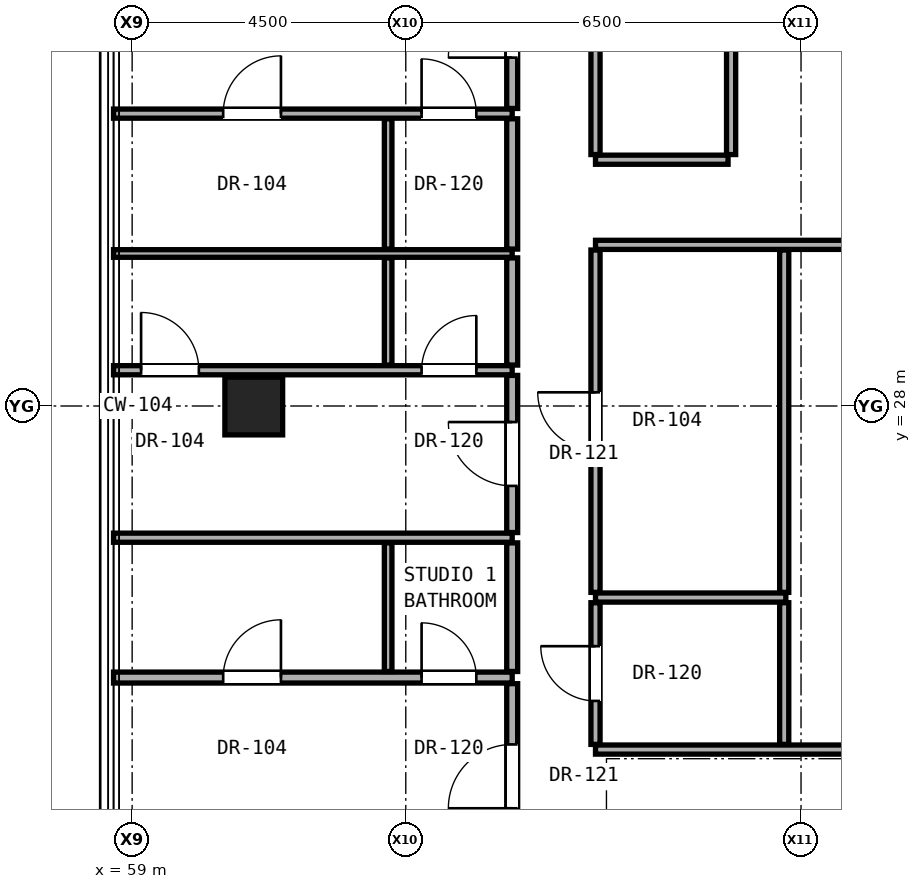
"""IFC4 building model, lengths in metres.
Left out: names, types, materials, properties, quantities, classifications, styles, units other than length and angle.
Written with IfcOpenShell. Run it as: python <this file> out.ifc"""

import sys

from ifc_helpers import new_model, si_unit, direction, frame, frame_2d, origin, origin_2d, place, context, subcontext, project, spatial, rectangle, hollow_rectangle, extrude, element, fill, save


model = new_model("IFC4")
c1 = context("Model", 3, precision=1e-05, world=origin(), true_north=direction((0.0, 1.0)))
c2 = subcontext(c1, "Body", "Model", "MODEL_VIEW")
j1 = project(units=[si_unit("LENGTHUNIT", "METRE"), si_unit("PLANEANGLEUNIT", "RADIAN")], contexts=[c1])
p1 = place(None, origin())
s1 = spatial("IfcSite", under=j1, at=p1, CompositionType="ELEMENT")
p2 = place(p1, origin())
s2 = spatial("IfcBuilding", under=s1, at=p2, CompositionType="ELEMENT")
p3 = place(p2, frame((0.0, 0.0, 203.15)))
s3 = spatial("IfcBuildingStorey", under=s2, at=p3, CompositionType="ELEMENT", Elevation=203.15)
p4 = place(p3, frame((61.0, 28.0, 0.0), z_axis=(0.0, 0.0, 1.0), x_axis=(1.0, 0.0, 0.0)))
e1 = element("IfcColumn", 1, at=p4, inside=s3, PredefinedType="COLUMN", context=c2, shape_type="SweptSolid", body=[
    extrude(hollow_rectangle(XDim=0.95, YDim=0.95, WallThickness=0.05, at=origin_2d()), origin(), (0.0, 0.0, 1.0), 3.25),
])
p5 = place(p3, frame((66.62, 22.35, 0.0), z_axis=(0.0, 0.0, 1.0), x_axis=(1.0, 0.0, 0.0)))
e2 = element("IfcWall", 2, at=p5, inside=s3, PredefinedType="PARTITIONING", context=c2, shape_type="SweptSolid", body=[
    extrude(rectangle(XDim=10.14, YDim=0.15, at=frame_2d((5.07, 0.0))), origin(), (0.0, 0.0, 1.0), 2.186),
])
p6 = place(p3, frame((58.694, 23.534, 0.0), z_axis=(0.0, 0.0, 1.0), x_axis=(1.0, 0.0, 0.0)))
e3 = element("IfcWall", 3, at=p6, inside=s3, PredefinedType="PARTITIONING", context=c2, shape_type="SweptSolid", body=[
    extrude(rectangle(XDim=6.556, YDim=0.18, at=frame_2d((3.278, 0.0))), origin(), (0.0, 0.0, 1.0), 2.269),
])
p7 = place(p6, frame((1.803, 0.0, 0.0)))
e4 = element("IfcOpeningElement", 4, at=p7, cuts=e3, PredefinedType="OPENING", context=c2, shape_type="SweptSolid", body=[
    extrude(rectangle(XDim=0.95, YDim=2.15, at=frame_2d((0.475, 1.075))), frame((0.0, 0.1, 0.0), z_axis=(0.0, -1.0, 0.0), x_axis=(1.0, 0.0, 0.0)), (0.0, 0.0, 1.0), 0.2),
])
p8 = place(p6, frame((5.066, 0.0, 0.0)))
e5 = element("IfcOpeningElement", 5, at=p8, cuts=e3, PredefinedType="OPENING", context=c2, shape_type="SweptSolid", body=[
    extrude(rectangle(XDim=0.9, YDim=2.1, at=frame_2d((0.45, 1.05))), frame((0.0, 0.1, 0.0), z_axis=(0.0, -1.0, 0.0), x_axis=(1.0, 0.0, 0.0)), (0.0, 0.0, 1.0), 0.2),
])
p9 = place(p3, frame((66.62, 24.85, 0.0), z_axis=(0.0, 0.0, 1.0), x_axis=(1.0, 0.0, 0.0)))
e6 = element("IfcWall", 6, at=p9, inside=s3, PredefinedType="PARTITIONING", context=c2, shape_type="SweptSolid", body=[
    extrude(rectangle(XDim=3.13, YDim=0.15, at=frame_2d((1.565, 0.0))), origin(), (0.0, 0.0, 1.0), 2.186),
])
p10 = place(p3, frame((58.694, 25.834, 0.0), z_axis=(0.0, 0.0, 1.0), x_axis=(1.0, 0.0, 0.0)))
e7 = element("IfcWall", 7, at=p10, inside=s3, PredefinedType="PARTITIONING", context=c2, shape_type="SweptSolid", body=[
    extrude(rectangle(XDim=6.556, YDim=0.15, at=frame_2d((3.278, 0.0))), origin(), (0.0, 0.0, 1.0), 2.269),
])
p11 = place(p3, frame((58.694, 28.588, 0.0), z_axis=(0.0, 0.0, 1.0), x_axis=(1.0, 0.0, 0.0)))
e8 = element("IfcWall", 8, at=p11, inside=s3, PredefinedType="PARTITIONING", context=c2, shape_type="SweptSolid", body=[
    extrude(rectangle(XDim=6.556, YDim=0.15, at=frame_2d((3.278, 0.0))), origin(), (0.0, 0.0, 1.0), 2.269),
])
p12 = place(p11, frame((0.453, 0.0, 0.0)))
e9 = element("IfcOpeningElement", 9, at=p12, cuts=e8, PredefinedType="OPENING", context=c2, shape_type="SweptSolid", body=[
    extrude(rectangle(XDim=0.95, YDim=2.15, at=frame_2d((0.475, 1.075))), frame((0.0, 0.085, 0.0), z_axis=(0.0, -1.0, 0.0), x_axis=(1.0, 0.0, 0.0)), (0.0, 0.0, 1.0), 0.17),
])
p13 = place(p11, frame((5.066, 0.0, 0.0)))
e10 = element("IfcOpeningElement", 10, at=p13, cuts=e8, PredefinedType="OPENING", context=c2, shape_type="SweptSolid", body=[
    extrude(rectangle(XDim=0.9, YDim=2.1, at=frame_2d((0.45, 1.05))), frame((0.0, 0.085, 0.0), z_axis=(0.0, -1.0, 0.0), x_axis=(1.0, 0.0, 0.0)), (0.0, 0.0, 1.0), 0.17),
])
p14 = place(p3, frame((58.694, 30.508, 0.0), z_axis=(0.0, 0.0, 1.0), x_axis=(1.0, 0.0, 0.0)))
e11 = element("IfcWall", 11, at=p14, inside=s3, PredefinedType="PARTITIONING", context=c2, shape_type="SweptSolid", body=[
    extrude(rectangle(XDim=6.556, YDim=0.125, at=frame_2d((3.278, 0.0))), origin(), (0.0, 0.0, 1.0), 2.269),
])
p15 = place(p3, frame((66.62, 30.65, 0.0), z_axis=(0.0, 0.0, 1.0), x_axis=(1.0, 0.0, 0.0)))
e12 = element("IfcWall", 12, at=p15, inside=s3, PredefinedType="PARTITIONING", context=c2, shape_type="SweptSolid", body=[
    extrude(rectangle(XDim=10.14, YDim=0.15, at=frame_2d((5.07, 0.0))), origin(), (0.0, 0.0, 1.0), 2.186),
])
p16 = place(p15, frame((6.14, 0.0, 0.0)))
e13 = element("IfcOpeningElement", 13, at=p16, cuts=e12, PredefinedType="OPENING", context=c2, shape_type="SweptSolid", body=[
    extrude(rectangle(XDim=0.95, YDim=2.15, at=frame_2d((0.475, 1.075))), frame((0.0, 0.085, 0.0), z_axis=(0.0, -1.0, 0.0), x_axis=(1.0, 0.0, 0.0)), (0.0, 0.0, 1.0), 0.17),
])
p17 = place(p3, frame((66.62, 32.05, 0.0), z_axis=(0.0, 0.0, 1.0), x_axis=(1.0, 0.0, 0.0)))
e14 = element("IfcWall", 14, at=p17, inside=s3, PredefinedType="PARTITIONING", context=c2, shape_type="SweptSolid", body=[
    extrude(rectangle(XDim=2.18, YDim=0.15, at=frame_2d((1.09, 0.0))), origin(), (0.0, 0.0, 1.0), 2.186),
])
p18 = place(p3, frame((58.694, 32.808, 0.0), z_axis=(0.0, 0.0, 1.0), x_axis=(1.0, 0.0, 0.0)))
e15 = element("IfcWall", 15, at=p18, inside=s3, PredefinedType="PARTITIONING", context=c2, shape_type="SweptSolid", body=[
    extrude(rectangle(XDim=6.556, YDim=0.15, at=frame_2d((3.278, 0.0))), origin(), (0.0, 0.0, 1.0), 2.269),
])
p19 = place(p18, frame((1.803, 0.0, 0.0)))
e16 = element("IfcOpeningElement", 16, at=p19, cuts=e15, PredefinedType="OPENING", context=c2, shape_type="SweptSolid", body=[
    extrude(rectangle(XDim=0.95, YDim=2.15, at=frame_2d((0.475, 1.075))), frame((0.0, 0.085, 0.0), z_axis=(0.0, -1.0, 0.0), x_axis=(1.0, 0.0, 0.0)), (0.0, 0.0, 1.0), 0.17),
])
p20 = place(p18, frame((5.066, 0.0, 0.0)))
e17 = element("IfcOpeningElement", 17, at=p20, cuts=e15, PredefinedType="OPENING", context=c2, shape_type="SweptSolid", body=[
    extrude(rectangle(XDim=0.9, YDim=2.1, at=frame_2d((0.45, 1.05))), frame((0.0, 0.085, 0.0), z_axis=(0.0, -1.0, 0.0), x_axis=(1.0, 0.0, 0.0)), (0.0, 0.0, 1.0), 0.17),
])
p21 = place(p3, frame((63.21, 23.634, 0.0), z_axis=(0.0, 0.0, 1.0), x_axis=(0.0, 1.0, 0.0)))
e18 = element("IfcWall", 18, at=p21, inside=s3, PredefinedType="PARTITIONING", context=c2, shape_type="SweptSolid", body=[
    extrude(rectangle(XDim=2.115, YDim=0.125, at=frame_2d((1.058, 0.0))), origin(), (0.0, 0.0, 1.0), 3.05),
])
p22 = place(p3, frame((63.21, 28.673, 0.0), z_axis=(0.0, 0.0, 1.0), x_axis=(0.0, 1.0, 0.0)))
e19 = element("IfcWall", 19, at=p22, inside=s3, PredefinedType="PARTITIONING", context=c2, shape_type="SweptSolid", body=[
    extrude(rectangle(XDim=1.762, YDim=0.125, at=frame_2d((0.881, 0.0))), origin(), (0.0, 0.0, 1.0), 3.05),
])
p23 = place(p3, frame((63.21, 30.581, 0.0), z_axis=(0.0, 0.0, 1.0), x_axis=(0.0, 1.0, 0.0)))
e20 = element("IfcWall", 20, at=p23, inside=s3, PredefinedType="PARTITIONING", context=c2, shape_type="SweptSolid", body=[
    extrude(rectangle(XDim=2.142, YDim=0.125, at=frame_2d((1.071, 0.0))), origin(), (0.0, 0.0, 1.0), 3.05),
])
p24 = place(p3, frame((65.25, 20.385, 0.0), z_axis=(0.0, 0.0, 1.0), x_axis=(0.0, 1.0, 0.0)))
e21 = element("IfcWall", 21, at=p24, inside=s3, PredefinedType="PARTITIONING", context=c2, shape_type="SweptSolid", body=[
    extrude(rectangle(XDim=3.049, YDim=0.18, at=frame_2d((1.524, 0.0))), origin(), (0.0, 0.0, 1.0), 2.442),
])
p25 = place(p24, frame((1.0, 0.0, 0.0)))
e22 = element("IfcOpeningElement", 22, at=p25, cuts=e21, PredefinedType="OPENING", context=c2, shape_type="SweptSolid", body=[
    extrude(rectangle(XDim=1.05, YDim=2.2, at=frame_2d((0.525, 1.1))), frame((0.0, 0.1, 0.0), z_axis=(0.0, -1.0, 0.0), x_axis=(1.0, 0.0, 0.0)), (0.0, 0.0, 1.0), 0.2),
])
p26 = place(p3, frame((65.25, 23.634, 0.0), z_axis=(0.0, 0.0, 1.0), x_axis=(0.0, 1.0, 0.0)))
e23 = element("IfcWall", 23, at=p26, inside=s3, PredefinedType="PARTITIONING", context=c2, shape_type="SweptSolid", body=[
    extrude(rectangle(XDim=2.115, YDim=0.18, at=frame_2d((1.058, 0.0))), origin(), (0.0, 0.0, 1.0), 3.05),
])
p27 = place(p3, frame((65.25, 25.919, 0.0), z_axis=(0.0, 0.0, 1.0), x_axis=(0.0, 1.0, 0.0)))
e24 = element("IfcWall", 24, at=p27, inside=s3, PredefinedType="PARTITIONING", context=c2, shape_type="SweptSolid", body=[
    extrude(rectangle(XDim=2.584, YDim=0.18, at=frame_2d((1.292, 0.0))), origin(), (0.0, 0.0, 1.0), 2.346),
])
p28 = place(p27, frame((0.767, 0.0, 0.0)))
e25 = element("IfcOpeningElement", 25, at=p28, cuts=e24, PredefinedType="OPENING", context=c2, shape_type="SweptSolid", body=[
    extrude(rectangle(XDim=1.05, YDim=2.2, at=frame_2d((0.525, 1.1))), frame((0.0, 0.1, 0.0), z_axis=(0.0, -1.0, 0.0), x_axis=(1.0, 0.0, 0.0)), (0.0, 0.0, 1.0), 0.2),
])
p29 = place(p3, frame((65.25, 28.673, 0.0), z_axis=(0.0, 0.0, 1.0), x_axis=(0.0, 1.0, 0.0)))
e26 = element("IfcWall", 26, at=p29, inside=s3, PredefinedType="PARTITIONING", context=c2, shape_type="SweptSolid", body=[
    extrude(rectangle(XDim=1.762, YDim=0.18, at=frame_2d((0.881, 0.0))), origin(), (0.0, 0.0, 1.0), 3.05),
])
p30 = place(p3, frame((65.25, 30.581, 0.0), z_axis=(0.0, 0.0, 1.0), x_axis=(0.0, 1.0, 0.0)))
e27 = element("IfcWall", 27, at=p30, inside=s3, PredefinedType="PARTITIONING", context=c2, shape_type="SweptSolid", body=[
    extrude(rectangle(XDim=2.142, YDim=0.18, at=frame_2d((1.071, 0.0))), origin(), (0.0, 0.0, 1.0), 3.05),
])
p31 = place(p3, frame((65.25, 32.893, 0.0), z_axis=(0.0, 0.0, 1.0), x_axis=(0.0, 1.0, 0.0)))
e28 = element("IfcWall", 28, at=p31, inside=s3, PredefinedType="PARTITIONING", context=c2, shape_type="SweptSolid", body=[
    extrude(rectangle(XDim=2.722, YDim=0.18, at=frame_2d((1.361, 0.0))), origin(), (0.0, 0.0, 1.0), 2.442),
])
p32 = place(p31, frame((0.836, 0.0, 0.0)))
e29 = element("IfcOpeningElement", 29, at=p32, cuts=e28, PredefinedType="OPENING", context=c2, shape_type="SweptSolid", body=[
    extrude(rectangle(XDim=1.05, YDim=2.2, at=frame_2d((0.525, 1.1))), frame((0.0, 0.1, 0.0), z_axis=(0.0, -1.0, 0.0), x_axis=(1.0, 0.0, 0.0)), (0.0, 0.0, 1.0), 0.2),
])
p33 = place(p3, frame((66.62, 22.435, 0.0), z_axis=(0.0, 0.0, 1.0), x_axis=(0.0, 1.0, 0.0)))
e30 = element("IfcWall", 30, at=p33, inside=s3, PredefinedType="PARTITIONING", context=c2, shape_type="SweptSolid", body=[
    extrude(rectangle(XDim=2.33, YDim=0.15, at=frame_2d((1.165, 0.0))), origin(), (0.0, 0.0, 1.0), 3.05),
])
p34 = place(p33, frame((0.715, 0.0, 0.0)))
e31 = element("IfcOpeningElement", 31, at=p34, cuts=e30, PredefinedType="OPENING", context=c2, shape_type="SweptSolid", body=[
    extrude(rectangle(XDim=0.9, YDim=2.1, at=frame_2d((0.45, 1.05))), frame((0.0, 0.085, 0.0), z_axis=(0.0, -1.0, 0.0), x_axis=(1.0, 0.0, 0.0)), (0.0, 0.0, 1.0), 0.17),
])
p35 = place(p3, frame((66.62, 24.935, 0.0), z_axis=(0.0, 0.0, 1.0), x_axis=(0.0, 1.0, 0.0)))
e32 = element("IfcWall", 32, at=p35, inside=s3, PredefinedType="PARTITIONING", context=c2, shape_type="SweptSolid", body=[
    extrude(rectangle(XDim=5.63, YDim=0.15, at=frame_2d((2.815, 0.0))), origin(), (0.0, 0.0, 1.0), 2.346),
])
p36 = place(p35, frame((2.34, 0.0, 0.0)))
e33 = element("IfcOpeningElement", 33, at=p36, cuts=e32, PredefinedType="OPENING", context=c2, shape_type="SweptSolid", body=[
    extrude(rectangle(XDim=0.95, YDim=2.15, at=frame_2d((0.475, 1.075))), frame((0.0, 0.085, 0.0), z_axis=(0.0, -1.0, 0.0), x_axis=(1.0, 0.0, 0.0)), (0.0, 0.0, 1.0), 0.17),
])
p37 = place(p3, frame((66.62, 32.135, 0.0), z_axis=(0.0, 0.0, 1.0), x_axis=(0.0, 1.0, 0.0)))
e34 = element("IfcWall", 34, at=p37, inside=s3, PredefinedType="PARTITIONING", context=c2, shape_type="SweptSolid", body=[
    extrude(rectangle(XDim=3.48, YDim=0.15, at=frame_2d((1.74, 0.0))), origin(), (0.0, 0.0, 1.0), 2.442),
])
p38 = place(p3, frame((68.85, 32.135, 0.0), z_axis=(0.0, 0.0, 1.0), x_axis=(0.0, 1.0, 0.0)))
e35 = element("IfcWall", 35, at=p38, inside=s3, PredefinedType="PARTITIONING", context=c2, shape_type="SweptSolid", body=[
    extrude(rectangle(XDim=2.795, YDim=0.15, at=frame_2d((1.397, 0.0))), origin(), (0.0, 0.0, 1.0), 3.05),
])
p39 = place(p3, frame((69.723, 22.435, 0.0), z_axis=(0.0, 0.0, 1.0), x_axis=(0.0, 1.0, 0.0)))
e36 = element("IfcWall", 36, at=p39, inside=s3, PredefinedType="PARTITIONING", context=c2, shape_type="SweptSolid", body=[
    extrude(rectangle(XDim=2.33, YDim=0.15, at=frame_2d((1.165, 0.0))), origin(), (0.0, 0.0, 1.0), 3.05),
])
p40 = place(p3, frame((69.723, 24.935, 0.0), z_axis=(0.0, 0.0, 1.0), x_axis=(0.0, 1.0, 0.0)))
e37 = element("IfcWall", 37, at=p40, inside=s3, PredefinedType="PARTITIONING", context=c2, shape_type="SweptSolid", body=[
    extrude(rectangle(XDim=5.63, YDim=0.15, at=frame_2d((2.815, 0.0))), origin(), (0.0, 0.0, 1.0), 2.186),
])
p41 = place(p34, origin())
e38 = element("IfcDoor", 38, at=p41, inside=s3, OperationType="SINGLE_SWING_RIGHT", PredefinedType="DOOR", context=c2, shape_type="SweptSolid", body=[
    extrude(rectangle(XDim=0.9, YDim=2.1, at=frame_2d((0.45, 1.05))), frame((0.0, 0.025, 0.0), z_axis=(0.0, -1.0, 0.0), x_axis=(1.0, 0.0, 0.0)), (0.0, 0.0, 1.0), 0.05),
])
fill(e31, e38)
p42 = place(p25, origin())
e39 = element("IfcDoor", 39, at=p42, inside=s3, OperationType="SINGLE_SWING_LEFT", PredefinedType="DOOR", context=c2, shape_type="SweptSolid", body=[
    extrude(rectangle(XDim=1.05, YDim=2.2, at=frame_2d((0.525, 1.1))), frame((0.0, 0.025, 0.0), z_axis=(0.0, -1.0, 0.0), x_axis=(1.0, 0.0, 0.0)), (0.0, 0.0, 1.0), 0.05),
])
fill(e22, e39)
p43 = place(p7, origin())
e40 = element("IfcDoor", 40, at=p43, inside=s3, OperationType="SINGLE_SWING_RIGHT", PredefinedType="DOOR", context=c2, shape_type="SweptSolid", body=[
    extrude(rectangle(XDim=0.95, YDim=2.15, at=frame_2d((0.475, 1.075))), frame((0.0, 0.025, 0.0), z_axis=(0.0, -1.0, 0.0), x_axis=(1.0, 0.0, 0.0)), (0.0, 0.0, 1.0), 0.05),
])
fill(e4, e40)
p44 = place(p8, origin())
e41 = element("IfcDoor", 41, at=p44, inside=s3, OperationType="SINGLE_SWING_LEFT", PredefinedType="DOOR", context=c2, shape_type="SweptSolid", body=[
    extrude(rectangle(XDim=0.9, YDim=2.1, at=frame_2d((0.45, 1.05))), frame((0.0, 0.025, 0.0), z_axis=(0.0, -1.0, 0.0), x_axis=(1.0, 0.0, 0.0)), (0.0, 0.0, 1.0), 0.05),
])
fill(e5, e41)
p45 = place(p28, origin())
e42 = element("IfcDoor", 42, at=p45, inside=s3, OperationType="SINGLE_SWING_RIGHT", PredefinedType="DOOR", context=c2, shape_type="SweptSolid", body=[
    extrude(rectangle(XDim=1.05, YDim=2.2, at=frame_2d((0.525, 1.1))), frame((0.0, 0.025, 0.0), z_axis=(0.0, -1.0, 0.0), x_axis=(1.0, 0.0, 0.0)), (0.0, 0.0, 1.0), 0.05),
])
fill(e25, e42)
p46 = place(p12, origin())
e43 = element("IfcDoor", 43, at=p46, inside=s3, OperationType="SINGLE_SWING_LEFT", PredefinedType="DOOR", context=c2, shape_type="SweptSolid", body=[
    extrude(rectangle(XDim=0.95, YDim=2.15, at=frame_2d((0.475, 1.075))), frame((0.0, 0.025, 0.0), z_axis=(0.0, -1.0, 0.0), x_axis=(1.0, 0.0, 0.0)), (0.0, 0.0, 1.0), 0.05),
])
fill(e9, e43)
p47 = place(p13, origin())
e44 = element("IfcDoor", 44, at=p47, inside=s3, OperationType="SINGLE_SWING_RIGHT", PredefinedType="DOOR", context=c2, shape_type="SweptSolid", body=[
    extrude(rectangle(XDim=0.9, YDim=2.1, at=frame_2d((0.45, 1.05))), frame((0.0, 0.025, 0.0), z_axis=(0.0, -1.0, 0.0), x_axis=(1.0, 0.0, 0.0)), (0.0, 0.0, 1.0), 0.05),
])
fill(e10, e44)
p48 = place(p32, origin())
e45 = element("IfcDoor", 45, at=p48, inside=s3, OperationType="SINGLE_SWING_LEFT", PredefinedType="DOOR", context=c2, shape_type="SweptSolid", body=[
    extrude(rectangle(XDim=1.05, YDim=2.2, at=frame_2d((0.525, 1.1))), frame((0.0, 0.025, 0.0), z_axis=(0.0, -1.0, 0.0), x_axis=(1.0, 0.0, 0.0)), (0.0, 0.0, 1.0), 0.05),
])
fill(e29, e45)
p49 = place(p19, origin())
e46 = element("IfcDoor", 46, at=p49, inside=s3, OperationType="SINGLE_SWING_RIGHT", PredefinedType="DOOR", context=c2, shape_type="SweptSolid", body=[
    extrude(rectangle(XDim=0.95, YDim=2.15, at=frame_2d((0.475, 1.075))), frame((0.0, 0.025, 0.0), z_axis=(0.0, -1.0, 0.0), x_axis=(1.0, 0.0, 0.0)), (0.0, 0.0, 1.0), 0.05),
])
fill(e16, e46)
p50 = place(p20, origin())
e47 = element("IfcDoor", 47, at=p50, inside=s3, OperationType="SINGLE_SWING_LEFT", PredefinedType="DOOR", context=c2, shape_type="SweptSolid", body=[
    extrude(rectangle(XDim=0.9, YDim=2.1, at=frame_2d((0.45, 1.05))), frame((0.0, 0.025, 0.0), z_axis=(0.0, -1.0, 0.0), x_axis=(1.0, 0.0, 0.0)), (0.0, 0.0, 1.0), 0.05),
])
fill(e17, e47)
p51 = place(p36, origin())
e48 = element("IfcDoor", 48, at=p51, inside=s3, OperationType="SINGLE_SWING_RIGHT", PredefinedType="DOOR", context=c2, shape_type="SweptSolid", body=[
    extrude(rectangle(XDim=0.95, YDim=2.15, at=frame_2d((0.475, 1.075))), frame((0.0, 0.025, 0.0), z_axis=(0.0, -1.0, 0.0), x_axis=(1.0, 0.0, 0.0)), (0.0, 0.0, 1.0), 0.05),
])
fill(e33, e48)
save(model, sys.argv[1])
